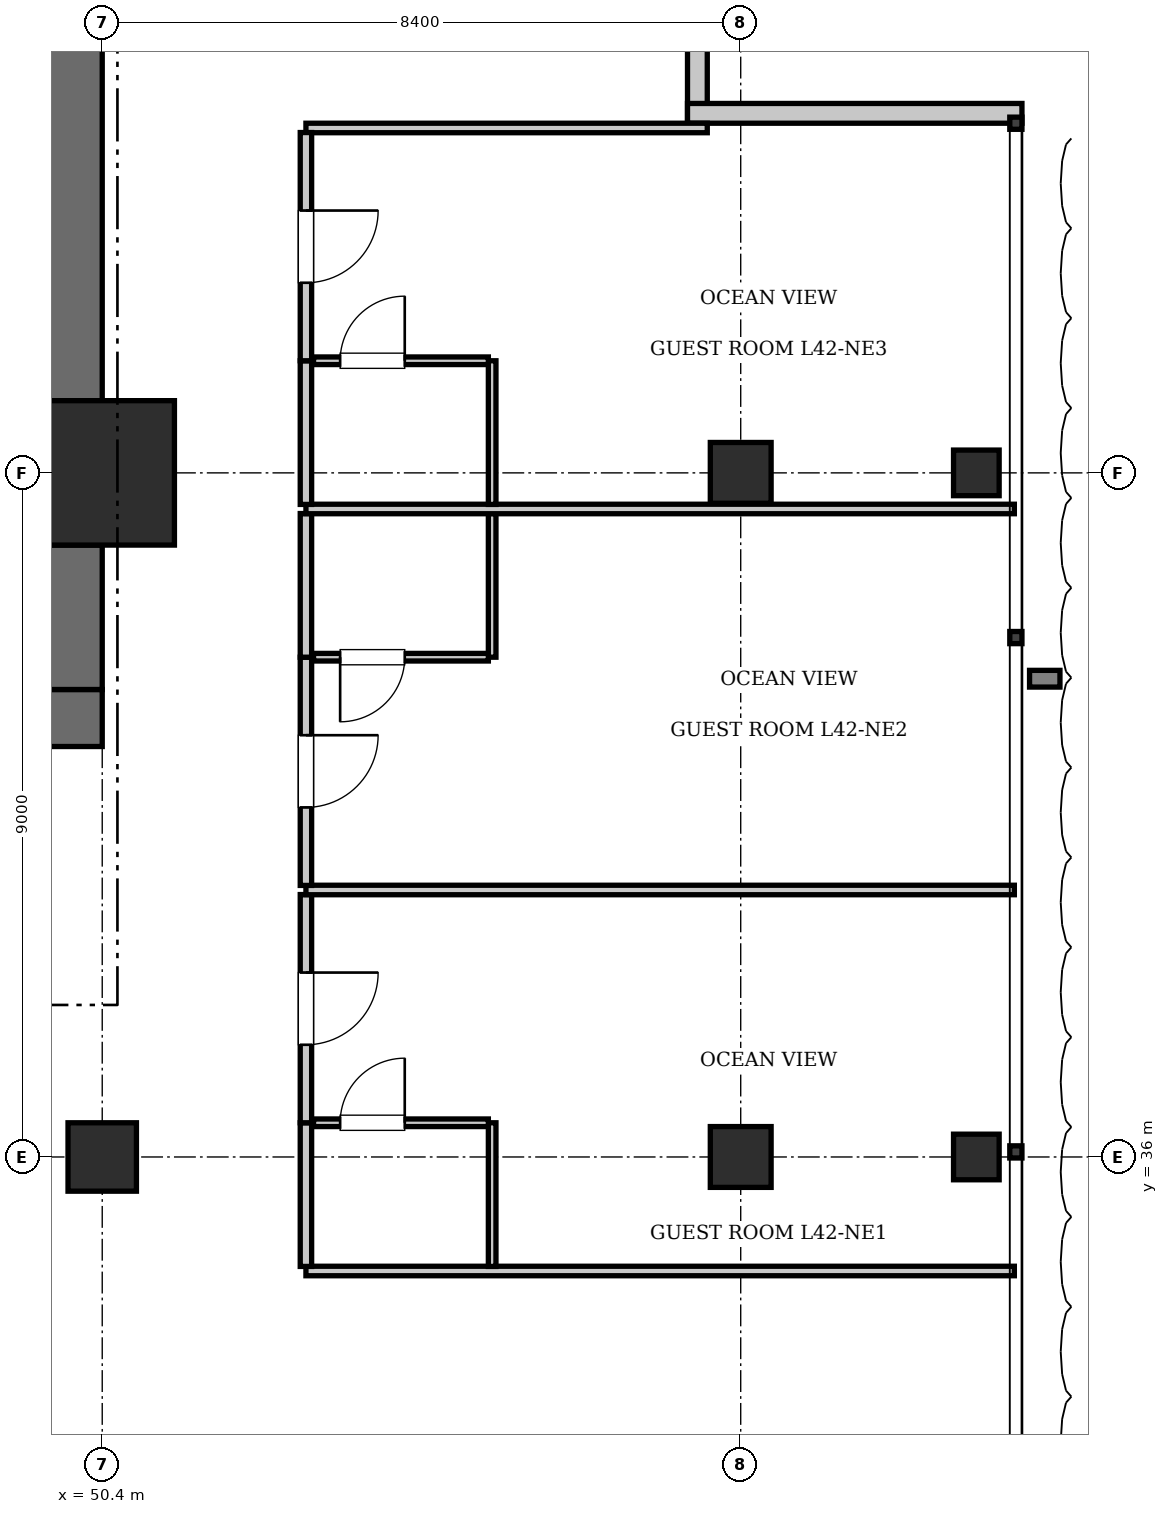
"""IFC4 building model, lengths in metres.
Left out: names, types, materials, properties, quantities, classifications, styles, units other than length and angle.
Written with IfcOpenShell. Run it as: python <this file> out.ifc"""

import sys

from ifc_helpers import new_model, si_unit, direction, frame, frame_2d, origin, origin_2d, place, context, subcontext, project, spatial, rectangle, i_section, extrude, element, fill, save


model = new_model("IFC4")
c1 = context("Model", 3, precision=1e-05, world=origin(), true_north=direction((0.0, 1.0)))
c2 = subcontext(c1, "Body", "Model", "MODEL_VIEW")
j1 = project(units=[si_unit("LENGTHUNIT", "METRE"), si_unit("PLANEANGLEUNIT", "RADIAN")], contexts=[c1])
p1 = place(None, origin())
s1 = spatial("IfcSite", under=j1, at=p1, CompositionType="ELEMENT")
p2 = place(p1, origin())
s2 = spatial("IfcBuilding", under=s1, at=p2, CompositionType="ELEMENT")
p3 = place(p2, frame((0.0, 0.0, 173.6)))
s3 = spatial("IfcBuildingStorey", under=s2, at=p3, CompositionType="ELEMENT", Elevation=173.6)
p4 = place(p3, frame((50.4, 45.0, 0.0), z_axis=(0.0, 0.0, 1.0), x_axis=(1.0, 0.0, 0.0)))
e1 = element("IfcColumn", 1, at=p4, inside=s3, PredefinedType="COLUMN", context=c2, shape_type="SweptSolid", body=[
    extrude(rectangle(XDim=1.9, YDim=1.9, at=origin_2d()), origin(), (0.0, 0.0, 1.0), 3.85),
])
p5 = place(p3, frame((43.6, 41.775, 0.0), z_axis=(0.0, 0.0, 1.0), x_axis=(1.0, 0.0, 0.0)))
e2 = element("IfcWall", 2, at=p5, inside=s3, PredefinedType="SHEAR", context=c2, shape_type="SweptSolid", body=[
    extrude(rectangle(XDim=6.8, YDim=0.75, at=frame_2d((3.4, 0.0))), origin(), (0.0, 0.0, 1.0), 3.85),
])
p6 = place(p5, frame((3.9, 0.0, 0.0)))
e3 = element("IfcOpeningElement", 3, at=p6, cuts=e2, PredefinedType="OPENING", context=c2, shape_type="SweptSolid", body=[
    extrude(rectangle(XDim=1.15, YDim=2.15, at=frame_2d((0.575, 1.075))), frame((0.0, 0.385, 0.0), z_axis=(0.0, -1.0, 0.0), x_axis=(1.0, 0.0, 0.0)), (0.0, 0.0, 1.0), 0.77),
])
p7 = place(p5, frame((0.55, 0.0, 0.0)))
e4 = element("IfcOpeningElement", 4, at=p7, cuts=e2, PredefinedType="OPENING", context=c2, shape_type="SweptSolid", body=[
    extrude(rectangle(XDim=1.1, YDim=2.2, at=frame_2d((0.55, 1.1))), frame((0.0, 0.385, 0.0), z_axis=(0.0, -1.0, 0.0), x_axis=(1.0, 0.0, 0.0)), (0.0, 0.0, 1.0), 0.77),
])
p8 = place(p3, frame((50.025, 42.15, 0.0), z_axis=(0.0, 0.0, 1.0), x_axis=(0.0, 1.0, 0.0)))
e5 = element("IfcWall", 5, at=p8, inside=s3, PredefinedType="SHEAR", context=c2, shape_type="SweptSolid", body=[
    extrude(rectangle(XDim=1.9, YDim=0.75, at=frame_2d((0.95, 0.0))), origin(), (0.0, 0.0, 1.0), 3.85),
])
p9 = place(p3, frame((50.025, 45.95, 0.0), z_axis=(0.0, 0.0, 1.0), x_axis=(0.0, 1.0, 0.0)))
e6 = element("IfcWall", 6, at=p9, inside=s3, PredefinedType="SHEAR", context=c2, shape_type="SweptSolid", body=[
    extrude(rectangle(XDim=7.3, YDim=0.75, at=frame_2d((3.65, 0.0))), origin(), (0.0, 0.0, 1.0), 3.85),
])
p10 = place(p3, frame((50.4, 36.0, 0.0), z_axis=(0.0, 0.0, 1.0), x_axis=(1.0, 0.0, 0.0)))
e7 = element("IfcColumn", 7, at=p10, inside=s3, PredefinedType="COLUMN", context=c2, shape_type="SweptSolid", body=[
    extrude(rectangle(XDim=0.9, YDim=0.9, at=origin_2d()), origin(), (0.0, 0.0, 1.0), 3.85),
])
for number, where, z_axis, x_axis in (
    (8, (58.8, 36.0, 0.0), (0.0, 0.0, 1.0), (1.0, 0.0, 0.0)),
    (9, (58.8, 45.0, 0.0), (0.0, 0.0, 1.0), (1.0, 0.0, 0.0)),
):
    element("IfcColumn", number, at=place(p3, frame(where, z_axis=z_axis, x_axis=x_axis)), inside=s3, PredefinedType="COLUMN", context=c2, shape_type="SweptSolid", body=[
        extrude(rectangle(XDim=0.8, YDim=0.8, at=origin_2d()), origin(), (0.0, 0.0, 1.0), 3.85),
    ])
for number, where, z_axis, x_axis in (
    (10, (61.9, 36.0, 0.0), (0.0, 0.0, 1.0), (1.0, 0.0, 0.0)),
    (11, (61.9, 45.0, 0.0), (0.0, 0.0, 1.0), (1.0, 0.0, 0.0)),
):
    element("IfcColumn", number, at=place(p3, frame(where, z_axis=z_axis, x_axis=x_axis)), inside=s3, PredefinedType="COLUMN", context=c2, shape_type="SweptSolid", body=[
        extrude(i_section(OverallWidth=0.6, OverallDepth=0.6, WebThickness=0.025, FlangeThickness=0.038, at=origin_2d()), origin(), (0.0, 0.0, 1.0), 3.85),
    ])
for number, where, z_axis, x_axis in (
    (12, (58.23, 54.0, 0.0), (0.0, 0.0, 1.0), (0.0, -1.0, 0.0)),
    (13, (58.1, 49.73, 0.0), (0.0, 0.0, 1.0), (1.0, 0.0, 0.0)),
):
    element("IfcWall", number, at=place(p3, frame(where, z_axis=z_axis, x_axis=x_axis)), inside=s3, PredefinedType="SOLIDWALL", context=c2, shape_type="SweptSolid", body=[
        extrude(rectangle(XDim=4.4, YDim=0.26, at=frame_2d((2.2, 0.0))), origin(), (0.0, 0.0, 1.0), 3.61),
    ])
p11 = place(p3, frame((53.08, 34.5, 0.0), z_axis=(0.0, 0.0, 1.0), x_axis=(1.0, 0.0, 0.0)))
e14 = element("IfcWall", 14, at=p11, inside=s3, PredefinedType="PARTITIONING", context=c2, shape_type="SweptSolid", body=[
    extrude(rectangle(XDim=9.32, YDim=0.125, at=frame_2d((4.66, 0.0))), origin(), (0.0, 0.0, 1.0), 3.61),
])
p12 = place(p3, frame((53.08, 49.538, 0.0), z_axis=(0.0, 0.0, 1.0), x_axis=(1.0, 0.0, 0.0)))
e15 = element("IfcWall", 15, at=p12, inside=s3, PredefinedType="PARTITIONING", context=c2, shape_type="SweptSolid", body=[
    extrude(rectangle(XDim=5.28, YDim=0.125, at=frame_2d((2.64, 0.0))), origin(), (0.0, 0.0, 1.0), 3.61),
])
p13 = place(p3, frame((53.08, 34.56, 0.0), z_axis=(0.0, 0.0, 1.0), x_axis=(0.0, 1.0, 0.0)))
e16 = element("IfcWall", 16, at=p13, inside=s3, PredefinedType="PARTITIONING", context=c2, shape_type="SweptSolid", body=[
    extrude(rectangle(XDim=1.89, YDim=0.15, at=frame_2d((0.945, 0.0))), origin(), (0.0, 0.0, 1.0), 3.61),
])
p14 = place(p3, frame((53.08, 36.45, 0.0), z_axis=(0.0, 0.0, 1.0), x_axis=(0.0, 1.0, 0.0)))
e17 = element("IfcWall", 17, at=p14, inside=s3, PredefinedType="PARTITIONING", context=c2, shape_type="SweptSolid", body=[
    extrude(rectangle(XDim=3.002, YDim=0.15, at=frame_2d((1.501, 0.0))), origin(), (0.0, 0.0, 1.0), 3.61),
])
p15 = place(p14, frame((1.026, 0.0, 0.0)))
e18 = element("IfcOpeningElement", 18, at=p15, cuts=e17, PredefinedType="OPENING", context=c2, shape_type="SweptSolid", body=[
    extrude(rectangle(XDim=0.95, YDim=2.15, at=frame_2d((0.475, 1.075))), frame((0.0, 0.085, 0.0), z_axis=(0.0, -1.0, 0.0), x_axis=(1.0, 0.0, 0.0)), (0.0, 0.0, 1.0), 0.17),
])
p16 = place(p3, frame((55.53, 34.56, 0.0), z_axis=(0.0, 0.0, 1.0), x_axis=(0.0, 1.0, 0.0)))
e19 = element("IfcWall", 19, at=p16, inside=s3, PredefinedType="PARTITIONING", context=c2, shape_type="SweptSolid", body=[
    extrude(rectangle(XDim=1.89, YDim=0.1, at=frame_2d((0.945, 0.0))), origin(), (0.0, 0.0, 1.0), 3.61),
])
p17 = place(p3, frame((53.18, 36.45, 0.0), z_axis=(0.0, 0.0, 1.0), x_axis=(1.0, 0.0, 0.0)))
e20 = element("IfcWall", 20, at=p17, inside=s3, PredefinedType="PARTITIONING", context=c2, shape_type="SweptSolid", body=[
    extrude(rectangle(XDim=2.3, YDim=0.1, at=frame_2d((1.15, 0.0))), origin(), (0.0, 0.0, 1.0), 3.61),
])
p18 = place(p17, frame((0.35, 0.0, 0.0)))
e21 = element("IfcOpeningElement", 21, at=p18, cuts=e20, PredefinedType="OPENING", context=c2, shape_type="SweptSolid", body=[
    extrude(rectangle(XDim=0.85, YDim=2.1, at=frame_2d((0.425, 1.05))), frame((0.0, 0.06, 0.0), z_axis=(0.0, -1.0, 0.0), x_axis=(1.0, 0.0, 0.0)), (0.0, 0.0, 1.0), 0.12),
])
p19 = place(p3, frame((53.08, 39.512, 0.0), z_axis=(0.0, 0.0, 1.0), x_axis=(1.0, 0.0, 0.0)))
e22 = element("IfcWall", 22, at=p19, inside=s3, PredefinedType="PARTITIONING", context=c2, shape_type="SweptSolid", body=[
    extrude(rectangle(XDim=9.32, YDim=0.125, at=frame_2d((4.66, 0.0))), origin(), (0.0, 0.0, 1.0), 3.61),
])
p20 = place(p3, frame((53.08, 39.573, 0.0), z_axis=(0.0, 0.0, 1.0), x_axis=(0.0, 1.0, 0.0)))
e23 = element("IfcWall", 23, at=p20, inside=s3, PredefinedType="PARTITIONING", context=c2, shape_type="SweptSolid", body=[
    extrude(rectangle(XDim=3.002, YDim=0.15, at=frame_2d((1.501, 0.0))), origin(), (0.0, 0.0, 1.0), 3.61),
])
p21 = place(p20, frame((1.026, 0.0, 0.0)))
e24 = element("IfcOpeningElement", 24, at=p21, cuts=e23, PredefinedType="OPENING", context=c2, shape_type="SweptSolid", body=[
    extrude(rectangle(XDim=0.95, YDim=2.15, at=frame_2d((0.475, 1.075))), frame((0.0, 0.085, 0.0), z_axis=(0.0, -1.0, 0.0), x_axis=(1.0, 0.0, 0.0)), (0.0, 0.0, 1.0), 0.17),
])
p22 = place(p3, frame((53.08, 42.575, 0.0), z_axis=(0.0, 0.0, 1.0), x_axis=(0.0, 1.0, 0.0)))
e25 = element("IfcWall", 25, at=p22, inside=s3, PredefinedType="PARTITIONING", context=c2, shape_type="SweptSolid", body=[
    extrude(rectangle(XDim=1.89, YDim=0.15, at=frame_2d((0.945, 0.0))), origin(), (0.0, 0.0, 1.0), 3.61),
])
p23 = place(p3, frame((55.53, 42.575, 0.0), z_axis=(0.0, 0.0, 1.0), x_axis=(0.0, 1.0, 0.0)))
e26 = element("IfcWall", 26, at=p23, inside=s3, PredefinedType="PARTITIONING", context=c2, shape_type="SweptSolid", body=[
    extrude(rectangle(XDim=1.89, YDim=0.1, at=frame_2d((0.945, 0.0))), origin(), (0.0, 0.0, 1.0), 3.61),
])
p24 = place(p3, frame((53.18, 42.575, 0.0), z_axis=(0.0, 0.0, 1.0), x_axis=(1.0, 0.0, 0.0)))
e27 = element("IfcWall", 27, at=p24, inside=s3, PredefinedType="PARTITIONING", context=c2, shape_type="SweptSolid", body=[
    extrude(rectangle(XDim=2.3, YDim=0.1, at=frame_2d((1.15, 0.0))), origin(), (0.0, 0.0, 1.0), 3.61),
])
p25 = place(p24, frame((0.35, 0.0, 0.0)))
e28 = element("IfcOpeningElement", 28, at=p25, cuts=e27, PredefinedType="OPENING", context=c2, shape_type="SweptSolid", body=[
    extrude(rectangle(XDim=0.85, YDim=2.1, at=frame_2d((0.425, 1.05))), frame((0.0, 0.06, 0.0), z_axis=(0.0, -1.0, 0.0), x_axis=(1.0, 0.0, 0.0)), (0.0, 0.0, 1.0), 0.12),
])
p26 = place(p3, frame((53.08, 44.525, 0.0), z_axis=(0.0, 0.0, 1.0), x_axis=(1.0, 0.0, 0.0)))
e29 = element("IfcWall", 29, at=p26, inside=s3, PredefinedType="PARTITIONING", context=c2, shape_type="SweptSolid", body=[
    extrude(rectangle(XDim=9.32, YDim=0.125, at=frame_2d((4.66, 0.0))), origin(), (0.0, 0.0, 1.0), 3.61),
])
p27 = place(p3, frame((53.08, 44.585, 0.0), z_axis=(0.0, 0.0, 1.0), x_axis=(0.0, 1.0, 0.0)))
e30 = element("IfcWall", 30, at=p27, inside=s3, PredefinedType="PARTITIONING", context=c2, shape_type="SweptSolid", body=[
    extrude(rectangle(XDim=1.89, YDim=0.15, at=frame_2d((0.945, 0.0))), origin(), (0.0, 0.0, 1.0), 3.61),
])
p28 = place(p3, frame((53.08, 46.475, 0.0), z_axis=(0.0, 0.0, 1.0), x_axis=(0.0, 1.0, 0.0)))
e31 = element("IfcWall", 31, at=p28, inside=s3, PredefinedType="PARTITIONING", context=c2, shape_type="SweptSolid", body=[
    extrude(rectangle(XDim=3.002, YDim=0.15, at=frame_2d((1.501, 0.0))), origin(), (0.0, 0.0, 1.0), 3.61),
])
p29 = place(p28, frame((1.026, 0.0, 0.0)))
e32 = element("IfcOpeningElement", 32, at=p29, cuts=e31, PredefinedType="OPENING", context=c2, shape_type="SweptSolid", body=[
    extrude(rectangle(XDim=0.95, YDim=2.15, at=frame_2d((0.475, 1.075))), frame((0.0, 0.085, 0.0), z_axis=(0.0, -1.0, 0.0), x_axis=(1.0, 0.0, 0.0)), (0.0, 0.0, 1.0), 0.17),
])
p30 = place(p3, frame((55.53, 44.585, 0.0), z_axis=(0.0, 0.0, 1.0), x_axis=(0.0, 1.0, 0.0)))
e33 = element("IfcWall", 33, at=p30, inside=s3, PredefinedType="PARTITIONING", context=c2, shape_type="SweptSolid", body=[
    extrude(rectangle(XDim=1.89, YDim=0.1, at=frame_2d((0.945, 0.0))), origin(), (0.0, 0.0, 1.0), 3.61),
])
p31 = place(p3, frame((53.18, 46.475, 0.0), z_axis=(0.0, 0.0, 1.0), x_axis=(1.0, 0.0, 0.0)))
e34 = element("IfcWall", 34, at=p31, inside=s3, PredefinedType="PARTITIONING", context=c2, shape_type="SweptSolid", body=[
    extrude(rectangle(XDim=2.3, YDim=0.1, at=frame_2d((1.15, 0.0))), origin(), (0.0, 0.0, 1.0), 3.61),
])
p32 = place(p31, frame((0.35, 0.0, 0.0)))
e35 = element("IfcOpeningElement", 35, at=p32, cuts=e34, PredefinedType="OPENING", context=c2, shape_type="SweptSolid", body=[
    extrude(rectangle(XDim=0.85, YDim=2.1, at=frame_2d((0.425, 1.05))), frame((0.0, 0.06, 0.0), z_axis=(0.0, -1.0, 0.0), x_axis=(1.0, 0.0, 0.0)), (0.0, 0.0, 1.0), 0.12),
])
p33 = place(p18, origin())
e36 = element("IfcDoor", 36, at=p33, inside=s3, OperationType="SINGLE_SWING_RIGHT", PredefinedType="DOOR", context=c2, shape_type="SweptSolid", body=[
    extrude(rectangle(XDim=0.85, YDim=2.1, at=frame_2d((0.425, 1.05))), frame((0.0, 0.025, 0.0), z_axis=(0.0, -1.0, 0.0), x_axis=(1.0, 0.0, 0.0)), (0.0, 0.0, 1.0), 0.05),
])
fill(e21, e36)
p34 = place(p15, frame((0.95, 0.0, 0.0), z_axis=(0.0, 0.0, 1.0), x_axis=(-1.0, 0.0, 0.0)))
e37 = element("IfcDoor", 37, at=p34, inside=s3, OperationType="SINGLE_SWING_LEFT", PredefinedType="DOOR", context=c2, shape_type="SweptSolid", body=[
    extrude(rectangle(XDim=0.95, YDim=2.15, at=frame_2d((0.475, 1.075))), frame((0.0, 0.025, 0.0), z_axis=(0.0, -1.0, 0.0), x_axis=(1.0, 0.0, 0.0)), (0.0, 0.0, 1.0), 0.05),
])
fill(e18, e37)
p35 = place(p25, frame((0.85, 0.0, 0.0), z_axis=(0.0, 0.0, 1.0), x_axis=(-1.0, 0.0, 0.0)))
e38 = element("IfcDoor", 38, at=p35, inside=s3, OperationType="SINGLE_SWING_RIGHT", PredefinedType="DOOR", context=c2, shape_type="SweptSolid", body=[
    extrude(rectangle(XDim=0.85, YDim=2.1, at=frame_2d((0.425, 1.05))), frame((0.0, 0.025, 0.0), z_axis=(0.0, -1.0, 0.0), x_axis=(1.0, 0.0, 0.0)), (0.0, 0.0, 1.0), 0.05),
])
fill(e28, e38)
p36 = place(p21, frame((0.95, 0.0, 0.0), z_axis=(0.0, 0.0, 1.0), x_axis=(-1.0, 0.0, 0.0)))
e39 = element("IfcDoor", 39, at=p36, inside=s3, OperationType="SINGLE_SWING_LEFT", PredefinedType="DOOR", context=c2, shape_type="SweptSolid", body=[
    extrude(rectangle(XDim=0.95, YDim=2.15, at=frame_2d((0.475, 1.075))), frame((0.0, 0.025, 0.0), z_axis=(0.0, -1.0, 0.0), x_axis=(1.0, 0.0, 0.0)), (0.0, 0.0, 1.0), 0.05),
])
fill(e24, e39)
p37 = place(p32, origin())
e40 = element("IfcDoor", 40, at=p37, inside=s3, OperationType="SINGLE_SWING_RIGHT", PredefinedType="DOOR", context=c2, shape_type="SweptSolid", body=[
    extrude(rectangle(XDim=0.85, YDim=2.1, at=frame_2d((0.425, 1.05))), frame((0.0, 0.025, 0.0), z_axis=(0.0, -1.0, 0.0), x_axis=(1.0, 0.0, 0.0)), (0.0, 0.0, 1.0), 0.05),
])
fill(e35, e40)
p38 = place(p29, frame((0.95, 0.0, 0.0), z_axis=(0.0, 0.0, 1.0), x_axis=(-1.0, 0.0, 0.0)))
e41 = element("IfcDoor", 41, at=p38, inside=s3, OperationType="SINGLE_SWING_LEFT", PredefinedType="DOOR", context=c2, shape_type="SweptSolid", body=[
    extrude(rectangle(XDim=0.95, YDim=2.15, at=frame_2d((0.475, 1.075))), frame((0.0, 0.025, 0.0), z_axis=(0.0, -1.0, 0.0), x_axis=(1.0, 0.0, 0.0)), (0.0, 0.0, 1.0), 0.05),
])
fill(e32, e41)
save(model, sys.argv[1])
